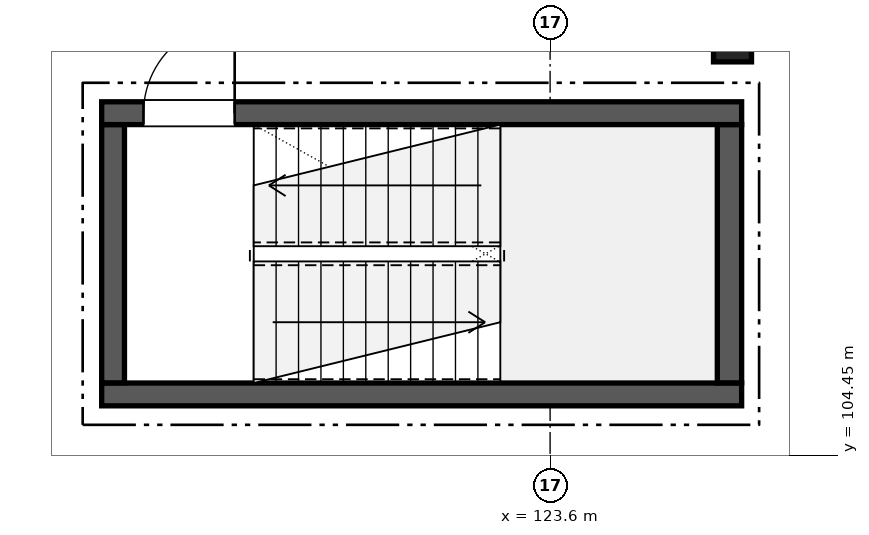
"""IFC4 building model, lengths in metres.
Left out: names, types, materials, properties, quantities, classifications, styles, units other than length and angle.
Written with IfcOpenShell. Run it as: python <this file> out.ifc"""

import sys

from ifc_helpers import new_model, si_unit, direction, frame, frame_2d, origin, origin_2d, place, context, subcontext, project, spatial, rectangle, extrude, element, fill, save


model = new_model("IFC4")
c1 = context("Model", 3, precision=1e-05, world=origin(), true_north=direction((0.0, 1.0)))
c2 = subcontext(c1, "Body", "Model", "MODEL_VIEW")
j1 = project(units=[si_unit("LENGTHUNIT", "METRE"), si_unit("PLANEANGLEUNIT", "RADIAN")], contexts=[c1])
p1 = place(None, origin())
s1 = spatial("IfcSite", under=j1, at=p1, CompositionType="ELEMENT")
p2 = place(p1, origin())
s2 = spatial("IfcBuilding", under=s1, at=p2, CompositionType="ELEMENT")
p3 = place(p2, frame((0.0, 0.0, 9.52)))
s3 = spatial("IfcBuildingStorey", under=s2, at=p3, CompositionType="ELEMENT", Elevation=9.52)
p4 = place(p3, frame((126.0, 110.0, 0.0), z_axis=(0.0, 0.0, 1.0), x_axis=(1.0, 0.0, 0.0)))
e1 = element("IfcColumn", 1, at=p4, inside=s3, PredefinedType="COLUMN", context=c2, shape_type="SweptSolid", body=[
    extrude(rectangle(XDim=0.5, YDim=0.75, at=origin_2d()), origin(), (0.0, 0.0, 1.0), 4.08),
])
p5 = place(p3, frame((117.7, 105.25, 0.0), z_axis=(0.0, 0.0, 1.0), x_axis=(1.0, 0.0, 0.0)))
e2 = element("IfcWall", 2, at=p5, inside=s3, PredefinedType="SHEAR", context=c2, shape_type="SweptSolid", body=[
    extrude(rectangle(XDim=8.42, YDim=0.3, at=frame_2d((4.21, 0.0))), origin(), (0.0, 0.0, 1.0), 3.82),
])
p6 = place(p3, frame((117.7, 108.95, 0.0), z_axis=(0.0, 0.0, 1.0), x_axis=(1.0, 0.0, 0.0)))
e3 = element("IfcWall", 3, at=p6, inside=s3, PredefinedType="SHEAR", context=c2, shape_type="SweptSolid", body=[
    extrude(rectangle(XDim=8.42, YDim=0.3, at=frame_2d((4.21, 0.0))), origin(), (0.0, 0.0, 1.0), 3.82),
])
p7 = place(p6, frame((0.55, 0.0, 0.0)))
e4 = element("IfcOpeningElement", 4, at=p7, cuts=e3, PredefinedType="OPENING", context=c2, shape_type="SweptSolid", body=[
    extrude(rectangle(XDim=1.2, YDim=2.2, at=frame_2d((0.6, 1.1))), frame((0.0, 0.16, 0.0), z_axis=(0.0, -1.0, 0.0), x_axis=(1.0, 0.0, 0.0)), (0.0, 0.0, 1.0), 0.32),
])
p8 = place(p3, frame((117.85, 105.402, 0.0), z_axis=(0.0, 0.0, 1.0), x_axis=(0.0, 1.0, 0.0)))
e5 = element("IfcWall", 5, at=p8, inside=s3, PredefinedType="SHEAR", context=c2, shape_type="SweptSolid", body=[
    extrude(rectangle(XDim=3.396, YDim=0.3, at=frame_2d((1.698, 0.0))), origin(), (0.0, 0.0, 1.0), 3.82),
])
p9 = place(p3, frame((125.96, 105.402, 0.0), z_axis=(0.0, 0.0, 1.0), x_axis=(0.0, 1.0, 0.0)))
e6 = element("IfcWall", 6, at=p9, inside=s3, PredefinedType="SHEAR", context=c2, shape_type="SweptSolid", body=[
    extrude(rectangle(XDim=3.396, YDim=0.32, at=frame_2d((1.698, 0.0))), origin(), (0.0, 0.0, 1.0), 3.82),
])
p10 = place(p7, origin())
e7 = element("IfcDoor", 7, at=p10, inside=s3, OperationType="SINGLE_SWING_RIGHT", PredefinedType="DOOR", context=c2, shape_type="SweptSolid", body=[
    extrude(rectangle(XDim=1.2, YDim=2.2, at=frame_2d((0.6, 1.1))), frame((0.0, 0.025, 0.0), z_axis=(0.0, -1.0, 0.0), x_axis=(1.0, 0.0, 0.0)), (0.0, 0.0, 1.0), 0.05),
])
fill(e4, e7)
save(model, sys.argv[1])
